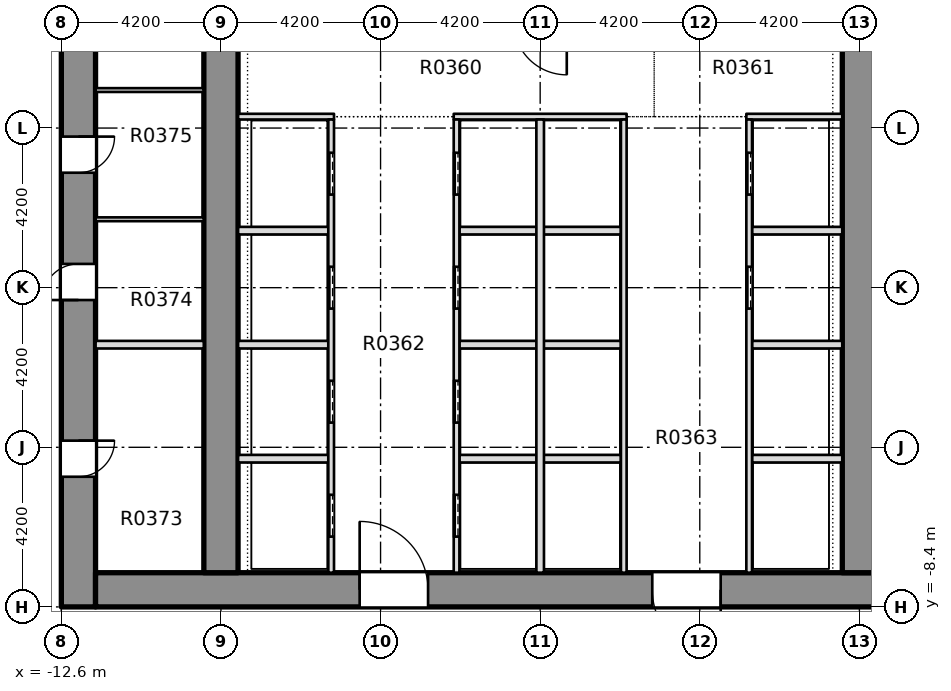
"""IFC4 building model, lengths in metres.
Left out: names, types, materials, properties, quantities, classifications, styles, units other than length and angle.
Written with IfcOpenShell. Run it as: python <this file> out.ifc"""

import sys

from ifc_helpers import new_model, si_unit, direction, frame, frame_2d, origin, place, context, subcontext, project, spatial, rectangle, extrude, element, fill, save


model = new_model("IFC4")
c1 = context("Model", 3, precision=1e-05, world=origin(), true_north=direction((0.0, 1.0)))
c2 = subcontext(c1, "Body", "Model", "MODEL_VIEW")
j1 = project(units=[si_unit("LENGTHUNIT", "METRE"), si_unit("PLANEANGLEUNIT", "RADIAN")], contexts=[c1])
p1 = place(None, origin())
s1 = spatial("IfcSite", under=j1, at=p1, CompositionType="ELEMENT")
p2 = place(p1, origin())
s2 = spatial("IfcBuilding", under=s1, at=p2, CompositionType="ELEMENT")
p3 = place(p2, frame((0.0, 0.0, 20.0)))
s3 = spatial("IfcBuildingStorey", under=s2, at=p3, CompositionType="ELEMENT", Elevation=20.0)
p4 = place(p3, frame((-12.15, -8.4, -0.4), z_axis=(0.0, 0.0, 1.0), x_axis=(0.0, 1.0, 0.0)))
e1 = element("IfcWall", 1, at=p4, inside=s3, PredefinedType="SHEAR", context=c2, shape_type="SweptSolid", body=[
    extrude(rectangle(XDim=30.15, YDim=0.9, at=frame_2d((15.075, 0.0))), origin(), (0.0, 0.0, 1.0), 5.0),
])
p5 = place(p4, frame((3.425, 0.0, 0.4)))
e2 = element("IfcOpeningElement", 2, at=p5, cuts=e1, PredefinedType="OPENING", context=c2, shape_type="SweptSolid", body=[
    extrude(rectangle(XDim=0.95, YDim=2.1, at=frame_2d((0.475, 1.05))), frame((0.0, 0.46, 0.0), z_axis=(0.0, -1.0, 0.0), x_axis=(1.0, 0.0, 0.0)), (0.0, 0.0, 1.0), 0.92),
])
p6 = place(p4, frame((8.075, 0.0, 0.4)))
e3 = element("IfcOpeningElement", 3, at=p6, cuts=e1, PredefinedType="OPENING", context=c2, shape_type="SweptSolid", body=[
    extrude(rectangle(XDim=0.95, YDim=2.1, at=frame_2d((0.475, 1.05))), frame((0.0, 0.46, 0.0), z_axis=(0.0, -1.0, 0.0), x_axis=(1.0, 0.0, 0.0)), (0.0, 0.0, 1.0), 0.92),
])
p7 = place(p4, frame((11.425, 0.0, 0.4)))
e4 = element("IfcOpeningElement", 4, at=p7, cuts=e1, PredefinedType="OPENING", context=c2, shape_type="SweptSolid", body=[
    extrude(rectangle(XDim=0.95, YDim=2.1, at=frame_2d((0.475, 1.05))), frame((0.0, 0.46, 0.0), z_axis=(0.0, -1.0, 0.0), x_axis=(1.0, 0.0, 0.0)), (0.0, 0.0, 1.0), 0.92),
])
p8 = place(p4, frame((15.625, 0.0, 0.4)))
e5 = element("IfcOpeningElement", 5, at=p8, cuts=e1, PredefinedType="OPENING", context=c2, shape_type="SweptSolid", body=[
    extrude(rectangle(XDim=0.95, YDim=2.1, at=frame_2d((0.475, 1.05))), frame((0.0, 0.46, 0.0), z_axis=(0.0, -1.0, 0.0), x_axis=(1.0, 0.0, 0.0)), (0.0, 0.0, 1.0), 0.92),
])
p9 = place(p4, frame((22.725, 0.0, 0.4)))
e6 = element("IfcOpeningElement", 6, at=p9, cuts=e1, PredefinedType="OPENING", context=c2, shape_type="SweptSolid", body=[
    extrude(rectangle(XDim=0.95, YDim=2.1, at=frame_2d((0.475, 1.05))), frame((0.0, 0.46, 0.0), z_axis=(0.0, -1.0, 0.0), x_axis=(1.0, 0.0, 0.0)), (0.0, 0.0, 1.0), 0.92),
])
p10 = place(p4, frame((26.75, 0.0, 0.4)))
e7 = element("IfcOpeningElement", 7, at=p10, cuts=e1, PredefinedType="OPENING", context=c2, shape_type="SweptSolid", body=[
    extrude(rectangle(XDim=0.95, YDim=2.1, at=frame_2d((0.475, 1.05))), frame((0.0, 0.46, 0.0), z_axis=(0.0, -1.0, 0.0), x_axis=(1.0, 0.0, 0.0)), (0.0, 0.0, 1.0), 0.92),
])
p11 = place(p4, frame((19.3, 0.0, 0.4)))
e8 = element("IfcOpeningElement", 8, at=p11, cuts=e1, PredefinedType="OPENING", context=c2, shape_type="SweptSolid", body=[
    extrude(rectangle(XDim=1.2, YDim=2.1, at=frame_2d((0.6, 1.05))), frame((0.0, 0.46, 0.0), z_axis=(0.0, -1.0, 0.0), x_axis=(1.0, 0.0, 0.0)), (0.0, 0.0, 1.0), 0.92),
])
p12 = place(p3, frame((-11.7, -7.95, -0.4), z_axis=(0.0, 0.0, 1.0), x_axis=(1.0, 0.0, 0.0)))
e9 = element("IfcWall", 9, at=p12, inside=s3, PredefinedType="SHEAR", context=c2, shape_type="SweptSolid", body=[
    extrude(rectangle(XDim=23.4, YDim=0.9, at=frame_2d((11.7, 0.0))), origin(), (0.0, 0.0, 1.0), 5.0),
])
p13 = place(p12, frame((6.95, 0.0, 0.4)))
e10 = element("IfcOpeningElement", 10, at=p13, cuts=e9, PredefinedType="OPENING", context=c2, shape_type="SweptSolid", body=[
    extrude(rectangle(XDim=1.8, YDim=2.1, at=frame_2d((0.9, 1.05))), frame((0.0, 0.46, 0.0), z_axis=(0.0, -1.0, 0.0), x_axis=(1.0, 0.0, 0.0)), (0.0, 0.0, 1.0), 0.92),
])
p14 = place(p12, frame((14.65, 0.0, 0.4)))
e11 = element("IfcOpeningElement", 11, at=p14, cuts=e9, PredefinedType="OPENING", context=c2, shape_type="SweptSolid", body=[
    extrude(rectangle(XDim=1.8, YDim=2.1, at=frame_2d((0.9, 1.05))), frame((0.0, 0.46, 0.0), z_axis=(0.0, -1.0, 0.0), x_axis=(1.0, 0.0, 0.0)), (0.0, 0.0, 1.0), 0.92),
])
p15 = place(p3, frame((-8.4, -7.5, -0.4), z_axis=(0.0, 0.0, 1.0), x_axis=(0.0, 1.0, 0.0)))
e12 = element("IfcWall", 12, at=p15, inside=s3, PredefinedType="SHEAR", context=c2, shape_type="SweptSolid", body=[
    extrude(rectangle(XDim=28.35, YDim=0.9, at=frame_2d((14.175, 0.0))), origin(), (0.0, 0.0, 1.0), 5.0),
])
p16 = place(p15, frame((18.4, 0.0, 0.4)))
e13 = element("IfcOpeningElement", 13, at=p16, cuts=e12, PredefinedType="OPENING", context=c2, shape_type="SweptSolid", body=[
    extrude(rectangle(XDim=1.2, YDim=2.1, at=frame_2d((0.6, 1.05))), frame((0.0, 0.46, 0.0), z_axis=(0.0, -1.0, 0.0), x_axis=(1.0, 0.0, 0.0)), (0.0, 0.0, 1.0), 0.92),
])
p17 = place(p3, frame((8.4, -7.5, -0.4), z_axis=(0.0, 0.0, 1.0), x_axis=(0.0, 1.0, 0.0)))
e14 = element("IfcWall", 14, at=p17, inside=s3, PredefinedType="SHEAR", context=c2, shape_type="SweptSolid", body=[
    extrude(rectangle(XDim=28.35, YDim=0.9, at=frame_2d((14.175, 0.0))), origin(), (0.0, 0.0, 1.0), 5.0),
])
p18 = place(p17, frame((18.4, 0.0, 0.4)))
e15 = element("IfcOpeningElement", 15, at=p18, cuts=e14, PredefinedType="OPENING", context=c2, shape_type="SweptSolid", body=[
    extrude(rectangle(XDim=1.2, YDim=2.1, at=frame_2d((0.6, 1.05))), frame((0.0, 0.46, 0.0), z_axis=(0.0, -1.0, 0.0), x_axis=(1.0, 0.0, 0.0)), (0.0, 0.0, 1.0), 0.92),
])
p19 = place(p3, frame((-7.949, -4.5, 0.0), z_axis=(0.0, 0.0, 1.0), x_axis=(1.0, 0.0, 0.0)))
e16 = element("IfcWall", 16, at=p19, inside=s3, PredefinedType="PARTITIONING", context=c2, shape_type="SweptSolid", body=[
    extrude(rectangle(XDim=2.374, YDim=0.2, at=frame_2d((1.187, 0.0))), origin(), (0.0, 0.0, 1.0), 4.6),
])
p20 = place(p3, frame((-2.125, -4.5, 0.0), z_axis=(0.0, 0.0, 1.0), x_axis=(1.0, 0.0, 0.0)))
e17 = element("IfcWall", 17, at=p20, inside=s3, PredefinedType="PARTITIONING", context=c2, shape_type="SweptSolid", body=[
    extrude(rectangle(XDim=4.25, YDim=0.2, at=frame_2d((2.125, 0.0))), origin(), (0.0, 0.0, 1.0), 4.6),
])
for number, where, z_axis, x_axis in (
    (18, (5.575, -4.5, 0.0), (0.0, 0.0, 1.0), (1.0, 0.0, 0.0)),
    (19, (-7.949, -1.5, 0.0), (0.0, 0.0, 1.0), (1.0, 0.0, 0.0)),
):
    element("IfcWall", number, at=place(p3, frame(where, z_axis=z_axis, x_axis=x_axis)), inside=s3, PredefinedType="PARTITIONING", context=c2, shape_type="SweptSolid", body=[
        extrude(rectangle(XDim=2.374, YDim=0.2, at=frame_2d((1.187, 0.0))), origin(), (0.0, 0.0, 1.0), 4.6),
    ])
p21 = place(p3, frame((-2.125, -1.5, 0.0), z_axis=(0.0, 0.0, 1.0), x_axis=(1.0, 0.0, 0.0)))
e20 = element("IfcWall", 20, at=p21, inside=s3, PredefinedType="PARTITIONING", context=c2, shape_type="SweptSolid", body=[
    extrude(rectangle(XDim=4.25, YDim=0.2, at=frame_2d((2.125, 0.0))), origin(), (0.0, 0.0, 1.0), 4.6),
])
for number, where, z_axis, x_axis in (
    (21, (5.575, -1.5, 0.0), (0.0, 0.0, 1.0), (1.0, 0.0, 0.0)),
    (22, (-7.949, 1.5, 0.0), (0.0, 0.0, 1.0), (1.0, 0.0, 0.0)),
):
    element("IfcWall", number, at=place(p3, frame(where, z_axis=z_axis, x_axis=x_axis)), inside=s3, PredefinedType="PARTITIONING", context=c2, shape_type="SweptSolid", body=[
        extrude(rectangle(XDim=2.374, YDim=0.2, at=frame_2d((1.187, 0.0))), origin(), (0.0, 0.0, 1.0), 4.6),
    ])
p22 = place(p3, frame((-2.125, 1.5, 0.0), z_axis=(0.0, 0.0, 1.0), x_axis=(1.0, 0.0, 0.0)))
e23 = element("IfcWall", 23, at=p22, inside=s3, PredefinedType="PARTITIONING", context=c2, shape_type="SweptSolid", body=[
    extrude(rectangle(XDim=4.25, YDim=0.2, at=frame_2d((2.125, 0.0))), origin(), (0.0, 0.0, 1.0), 4.6),
])
p23 = place(p3, frame((5.575, 1.5, 0.0), z_axis=(0.0, 0.0, 1.0), x_axis=(1.0, 0.0, 0.0)))
e24 = element("IfcWall", 24, at=p23, inside=s3, PredefinedType="PARTITIONING", context=c2, shape_type="SweptSolid", body=[
    extrude(rectangle(XDim=2.374, YDim=0.2, at=frame_2d((1.187, 0.0))), origin(), (0.0, 0.0, 1.0), 4.6),
])
p24 = place(p3, frame((-7.949, 4.5, 0.0), z_axis=(0.0, 0.0, 1.0), x_axis=(1.0, 0.0, 0.0)))
e25 = element("IfcWall", 25, at=p24, inside=s3, PredefinedType="PARTITIONING", context=c2, shape_type="SweptSolid", body=[
    extrude(rectangle(XDim=2.524, YDim=0.15, at=frame_2d((1.262, 0.0))), origin(), (0.0, 0.0, 1.0), 4.6),
])
p25 = place(p3, frame((-2.275, 4.5, 0.0), z_axis=(0.0, 0.0, 1.0), x_axis=(1.0, 0.0, 0.0)))
e26 = element("IfcWall", 26, at=p25, inside=s3, PredefinedType="PARTITIONING", context=c2, shape_type="SweptSolid", body=[
    extrude(rectangle(XDim=4.55, YDim=0.15, at=frame_2d((2.275, 0.0))), origin(), (0.0, 0.0, 1.0), 4.6),
])
p26 = place(p3, frame((5.425, 4.5, 0.0), z_axis=(0.0, 0.0, 1.0), x_axis=(1.0, 0.0, 0.0)))
e27 = element("IfcWall", 27, at=p26, inside=s3, PredefinedType="PARTITIONING", context=c2, shape_type="SweptSolid", body=[
    extrude(rectangle(XDim=2.524, YDim=0.15, at=frame_2d((1.262, 0.0))), origin(), (0.0, 0.0, 1.0), 4.6),
])
p27 = place(p3, frame((-5.5, -7.499, 0.0), z_axis=(0.0, 0.0, 1.0), x_axis=(0.0, 1.0, 0.0)))
e28 = element("IfcWall", 28, at=p27, inside=s3, PredefinedType="PARTITIONING", context=c2, shape_type="SweptSolid", body=[
    extrude(rectangle(XDim=11.924, YDim=0.15, at=frame_2d((5.962, 0.0))), origin(), (0.0, 0.0, 1.0), 4.6),
])
p28 = place(p27, frame((0.949, 0.0, 0.0)))
e29 = element("IfcOpeningElement", 29, at=p28, cuts=e28, PredefinedType="OPENING", context=c2, shape_type="SweptSolid", body=[
    extrude(rectangle(XDim=1.1, YDim=2.1, at=frame_2d((0.55, 1.05))), frame((0.0, 0.085, 0.0), z_axis=(0.0, -1.0, 0.0), x_axis=(1.0, 0.0, 0.0)), (0.0, 0.0, 1.0), 0.17),
])
p29 = place(p27, frame((3.949, 0.0, 0.0)))
e30 = element("IfcOpeningElement", 30, at=p29, cuts=e28, PredefinedType="OPENING", context=c2, shape_type="SweptSolid", body=[
    extrude(rectangle(XDim=1.1, YDim=2.1, at=frame_2d((0.55, 1.05))), frame((0.0, 0.085, 0.0), z_axis=(0.0, -1.0, 0.0), x_axis=(1.0, 0.0, 0.0)), (0.0, 0.0, 1.0), 0.17),
])
p30 = place(p27, frame((6.949, 0.0, 0.0)))
e31 = element("IfcOpeningElement", 31, at=p30, cuts=e28, PredefinedType="OPENING", context=c2, shape_type="SweptSolid", body=[
    extrude(rectangle(XDim=1.1, YDim=2.1, at=frame_2d((0.55, 1.05))), frame((0.0, 0.085, 0.0), z_axis=(0.0, -1.0, 0.0), x_axis=(1.0, 0.0, 0.0)), (0.0, 0.0, 1.0), 0.17),
])
p31 = place(p27, frame((9.949, 0.0, 0.0)))
e32 = element("IfcOpeningElement", 32, at=p31, cuts=e28, PredefinedType="OPENING", context=c2, shape_type="SweptSolid", body=[
    extrude(rectangle(XDim=1.1, YDim=2.1, at=frame_2d((0.55, 1.05))), frame((0.0, 0.085, 0.0), z_axis=(0.0, -1.0, 0.0), x_axis=(1.0, 0.0, 0.0)), (0.0, 0.0, 1.0), 0.17),
])
p32 = place(p3, frame((-2.2, -7.499, 0.0), z_axis=(0.0, 0.0, 1.0), x_axis=(0.0, 1.0, 0.0)))
e33 = element("IfcWall", 33, at=p32, inside=s3, PredefinedType="PARTITIONING", context=c2, shape_type="SweptSolid", body=[
    extrude(rectangle(XDim=11.924, YDim=0.15, at=frame_2d((5.962, 0.0))), origin(), (0.0, 0.0, 1.0), 4.6),
])
p33 = place(p32, frame((0.949, 0.0, 0.0)))
e34 = element("IfcOpeningElement", 34, at=p33, cuts=e33, PredefinedType="OPENING", context=c2, shape_type="SweptSolid", body=[
    extrude(rectangle(XDim=1.1, YDim=2.1, at=frame_2d((0.55, 1.05))), frame((0.0, 0.085, 0.0), z_axis=(0.0, -1.0, 0.0), x_axis=(1.0, 0.0, 0.0)), (0.0, 0.0, 1.0), 0.17),
])
p34 = place(p32, frame((3.949, 0.0, 0.0)))
e35 = element("IfcOpeningElement", 35, at=p34, cuts=e33, PredefinedType="OPENING", context=c2, shape_type="SweptSolid", body=[
    extrude(rectangle(XDim=1.1, YDim=2.1, at=frame_2d((0.55, 1.05))), frame((0.0, 0.085, 0.0), z_axis=(0.0, -1.0, 0.0), x_axis=(1.0, 0.0, 0.0)), (0.0, 0.0, 1.0), 0.17),
])
p35 = place(p32, frame((6.949, 0.0, 0.0)))
e36 = element("IfcOpeningElement", 36, at=p35, cuts=e33, PredefinedType="OPENING", context=c2, shape_type="SweptSolid", body=[
    extrude(rectangle(XDim=1.1, YDim=2.1, at=frame_2d((0.55, 1.05))), frame((0.0, 0.085, 0.0), z_axis=(0.0, -1.0, 0.0), x_axis=(1.0, 0.0, 0.0)), (0.0, 0.0, 1.0), 0.17),
])
p36 = place(p32, frame((9.949, 0.0, 0.0)))
e37 = element("IfcOpeningElement", 37, at=p36, cuts=e33, PredefinedType="OPENING", context=c2, shape_type="SweptSolid", body=[
    extrude(rectangle(XDim=1.1, YDim=2.1, at=frame_2d((0.55, 1.05))), frame((0.0, 0.085, 0.0), z_axis=(0.0, -1.0, 0.0), x_axis=(1.0, 0.0, 0.0)), (0.0, 0.0, 1.0), 0.17),
])
p37 = place(p3, frame((0.0, -7.499, 0.0), z_axis=(0.0, 0.0, 1.0), x_axis=(0.0, 1.0, 0.0)))
e38 = element("IfcWall", 38, at=p37, inside=s3, PredefinedType="PARTITIONING", context=c2, shape_type="SweptSolid", body=[
    extrude(rectangle(XDim=11.924, YDim=0.2, at=frame_2d((5.962, 0.0))), origin(), (0.0, 0.0, 1.0), 4.6),
])
p38 = place(p3, frame((2.2, -7.499, 0.0), z_axis=(0.0, 0.0, 1.0), x_axis=(0.0, 1.0, 0.0)))
e39 = element("IfcWall", 39, at=p38, inside=s3, PredefinedType="PARTITIONING", context=c2, shape_type="SweptSolid", body=[
    extrude(rectangle(XDim=11.924, YDim=0.15, at=frame_2d((5.962, 0.0))), origin(), (0.0, 0.0, 1.0), 4.6),
])
p39 = place(p3, frame((5.5, -7.499, 0.0), z_axis=(0.0, 0.0, 1.0), x_axis=(0.0, 1.0, 0.0)))
e40 = element("IfcWall", 40, at=p39, inside=s3, PredefinedType="PARTITIONING", context=c2, shape_type="SweptSolid", body=[
    extrude(rectangle(XDim=11.924, YDim=0.15, at=frame_2d((5.962, 0.0))), origin(), (0.0, 0.0, 1.0), 4.6),
])
p40 = place(p39, frame((6.949, 0.0, 0.0)))
e41 = element("IfcOpeningElement", 41, at=p40, cuts=e40, PredefinedType="OPENING", context=c2, shape_type="SweptSolid", body=[
    extrude(rectangle(XDim=1.1, YDim=2.1, at=frame_2d((0.55, 1.05))), frame((0.0, 0.085, 0.0), z_axis=(0.0, -1.0, 0.0), x_axis=(1.0, 0.0, 0.0)), (0.0, 0.0, 1.0), 0.17),
])
p41 = place(p39, frame((9.949, 0.0, 0.0)))
e42 = element("IfcOpeningElement", 42, at=p41, cuts=e40, PredefinedType="OPENING", context=c2, shape_type="SweptSolid", body=[
    extrude(rectangle(XDim=1.1, YDim=2.1, at=frame_2d((0.55, 1.05))), frame((0.0, 0.085, 0.0), z_axis=(0.0, -1.0, 0.0), x_axis=(1.0, 0.0, 0.0)), (0.0, 0.0, 1.0), 0.17),
])
p42 = place(p3, frame((-11.699, -1.5, 0.0), z_axis=(0.0, 0.0, 1.0), x_axis=(1.0, 0.0, 0.0)))
e43 = element("IfcWall", 43, at=p42, inside=s3, PredefinedType="PARTITIONING", context=c2, shape_type="SweptSolid", body=[
    extrude(rectangle(XDim=2.848, YDim=0.2, at=frame_2d((1.424, 0.0))), origin(), (0.0, 0.0, 1.0), 4.6),
])
for number, where, z_axis, x_axis in (
    (44, (-11.699, 1.8, 0.0), (0.0, 0.0, 1.0), (1.0, 0.0, 0.0)),
    (45, (-11.699, 5.2, 0.0), (0.0, 0.0, 1.0), (1.0, 0.0, 0.0)),
):
    element("IfcWall", number, at=place(p3, frame(where, z_axis=z_axis, x_axis=x_axis)), inside=s3, PredefinedType="PARTITIONING", context=c2, shape_type="SweptSolid", body=[
        extrude(rectangle(XDim=2.848, YDim=0.1, at=frame_2d((1.424, 0.0))), origin(), (0.0, 0.0, 1.0), 4.6),
    ])
p43 = place(p28, origin())
e46 = element("IfcDoor", 46, at=p43, inside=s3, OperationType="SLIDING_TO_RIGHT", PredefinedType="DOOR", context=c2, shape_type="SweptSolid", body=[
    extrude(rectangle(XDim=1.1, YDim=2.1, at=frame_2d((0.55, 1.05))), frame((0.0, 0.025, 0.0), z_axis=(0.0, -1.0, 0.0), x_axis=(1.0, 0.0, 0.0)), (0.0, 0.0, 1.0), 0.05),
])
fill(e29, e46)
p44 = place(p29, origin())
e47 = element("IfcDoor", 47, at=p44, inside=s3, OperationType="SLIDING_TO_RIGHT", PredefinedType="DOOR", context=c2, shape_type="SweptSolid", body=[
    extrude(rectangle(XDim=1.1, YDim=2.1, at=frame_2d((0.55, 1.05))), frame((0.0, 0.025, 0.0), z_axis=(0.0, -1.0, 0.0), x_axis=(1.0, 0.0, 0.0)), (0.0, 0.0, 1.0), 0.05),
])
fill(e30, e47)
p45 = place(p30, origin())
e48 = element("IfcDoor", 48, at=p45, inside=s3, OperationType="SLIDING_TO_RIGHT", PredefinedType="DOOR", context=c2, shape_type="SweptSolid", body=[
    extrude(rectangle(XDim=1.1, YDim=2.1, at=frame_2d((0.55, 1.05))), frame((0.0, 0.025, 0.0), z_axis=(0.0, -1.0, 0.0), x_axis=(1.0, 0.0, 0.0)), (0.0, 0.0, 1.0), 0.05),
])
fill(e31, e48)
p46 = place(p31, origin())
e49 = element("IfcDoor", 49, at=p46, inside=s3, OperationType="SLIDING_TO_RIGHT", PredefinedType="DOOR", context=c2, shape_type="SweptSolid", body=[
    extrude(rectangle(XDim=1.1, YDim=2.1, at=frame_2d((0.55, 1.05))), frame((0.0, 0.025, 0.0), z_axis=(0.0, -1.0, 0.0), x_axis=(1.0, 0.0, 0.0)), (0.0, 0.0, 1.0), 0.05),
])
fill(e32, e49)
p47 = place(p33, origin())
e50 = element("IfcDoor", 50, at=p47, inside=s3, OperationType="SLIDING_TO_RIGHT", PredefinedType="DOOR", context=c2, shape_type="SweptSolid", body=[
    extrude(rectangle(XDim=1.1, YDim=2.1, at=frame_2d((0.55, 1.05))), frame((0.0, 0.025, 0.0), z_axis=(0.0, -1.0, 0.0), x_axis=(1.0, 0.0, 0.0)), (0.0, 0.0, 1.0), 0.05),
])
fill(e34, e50)
p48 = place(p34, origin())
e51 = element("IfcDoor", 51, at=p48, inside=s3, OperationType="SLIDING_TO_RIGHT", PredefinedType="DOOR", context=c2, shape_type="SweptSolid", body=[
    extrude(rectangle(XDim=1.1, YDim=2.1, at=frame_2d((0.55, 1.05))), frame((0.0, 0.025, 0.0), z_axis=(0.0, -1.0, 0.0), x_axis=(1.0, 0.0, 0.0)), (0.0, 0.0, 1.0), 0.05),
])
fill(e35, e51)
p49 = place(p35, origin())
e52 = element("IfcDoor", 52, at=p49, inside=s3, OperationType="SLIDING_TO_RIGHT", PredefinedType="DOOR", context=c2, shape_type="SweptSolid", body=[
    extrude(rectangle(XDim=1.1, YDim=2.1, at=frame_2d((0.55, 1.05))), frame((0.0, 0.025, 0.0), z_axis=(0.0, -1.0, 0.0), x_axis=(1.0, 0.0, 0.0)), (0.0, 0.0, 1.0), 0.05),
])
fill(e36, e52)
p50 = place(p36, origin())
e53 = element("IfcDoor", 53, at=p50, inside=s3, OperationType="SLIDING_TO_RIGHT", PredefinedType="DOOR", context=c2, shape_type="SweptSolid", body=[
    extrude(rectangle(XDim=1.1, YDim=2.1, at=frame_2d((0.55, 1.05))), frame((0.0, 0.025, 0.0), z_axis=(0.0, -1.0, 0.0), x_axis=(1.0, 0.0, 0.0)), (0.0, 0.0, 1.0), 0.05),
])
fill(e37, e53)
p51 = place(p40, origin())
e54 = element("IfcDoor", 54, at=p51, inside=s3, OperationType="SLIDING_TO_RIGHT", PredefinedType="DOOR", context=c2, shape_type="SweptSolid", body=[
    extrude(rectangle(XDim=1.1, YDim=2.1, at=frame_2d((0.55, 1.05))), frame((0.0, 0.025, 0.0), z_axis=(0.0, -1.0, 0.0), x_axis=(1.0, 0.0, 0.0)), (0.0, 0.0, 1.0), 0.05),
])
fill(e41, e54)
p52 = place(p41, origin())
e55 = element("IfcDoor", 55, at=p52, inside=s3, OperationType="SLIDING_TO_RIGHT", PredefinedType="DOOR", context=c2, shape_type="SweptSolid", body=[
    extrude(rectangle(XDim=1.1, YDim=2.1, at=frame_2d((0.55, 1.05))), frame((0.0, 0.025, 0.0), z_axis=(0.0, -1.0, 0.0), x_axis=(1.0, 0.0, 0.0)), (0.0, 0.0, 1.0), 0.05),
])
fill(e42, e55)
p53 = place(p13, origin())
e56 = element("IfcDoor", 56, at=p53, inside=s3, OperationType="SINGLE_SWING_LEFT", PredefinedType="DOOR", context=c2, shape_type="SweptSolid", body=[
    extrude(rectangle(XDim=1.8, YDim=2.1, at=frame_2d((0.9, 1.05))), frame((0.0, 0.025, 0.0), z_axis=(0.0, -1.0, 0.0), x_axis=(1.0, 0.0, 0.0)), (0.0, 0.0, 1.0), 0.05),
])
fill(e10, e56)
p54 = place(p14, origin())
e57 = element("IfcDoor", 57, at=p54, inside=s3, OperationType="SINGLE_SWING_LEFT", PredefinedType="DOOR", context=c2, shape_type="SweptSolid", body=[
    extrude(rectangle(XDim=1.8, YDim=2.1, at=frame_2d((0.9, 1.05))), frame((0.0, 0.025, 0.0), z_axis=(0.0, -1.0, 0.0), x_axis=(1.0, 0.0, 0.0)), (0.0, 0.0, 1.0), 0.05),
])
fill(e11, e57)
p55 = place(p5, origin())
e58 = element("IfcDoor", 58, at=p55, inside=s3, OperationType="SINGLE_SWING_LEFT", PredefinedType="DOOR", context=c2, shape_type="SweptSolid", body=[
    extrude(rectangle(XDim=0.95, YDim=2.1, at=frame_2d((0.475, 1.05))), frame((0.0, 0.025, 0.0), z_axis=(0.0, -1.0, 0.0), x_axis=(1.0, 0.0, 0.0)), (0.0, 0.0, 1.0), 0.05),
])
fill(e2, e58)
p56 = place(p6, origin())
e59 = element("IfcDoor", 59, at=p56, inside=s3, OperationType="SINGLE_SWING_LEFT", PredefinedType="DOOR", context=c2, shape_type="SweptSolid", body=[
    extrude(rectangle(XDim=0.95, YDim=2.1, at=frame_2d((0.475, 1.05))), frame((0.0, 0.025, 0.0), z_axis=(0.0, -1.0, 0.0), x_axis=(1.0, 0.0, 0.0)), (0.0, 0.0, 1.0), 0.05),
])
fill(e3, e59)
p57 = place(p7, origin())
e60 = element("IfcDoor", 60, at=p57, inside=s3, OperationType="SINGLE_SWING_LEFT", PredefinedType="DOOR", context=c2, shape_type="SweptSolid", body=[
    extrude(rectangle(XDim=0.95, YDim=2.1, at=frame_2d((0.475, 1.05))), frame((0.0, 0.025, 0.0), z_axis=(0.0, -1.0, 0.0), x_axis=(1.0, 0.0, 0.0)), (0.0, 0.0, 1.0), 0.05),
])
fill(e4, e60)
save(model, sys.argv[1])
